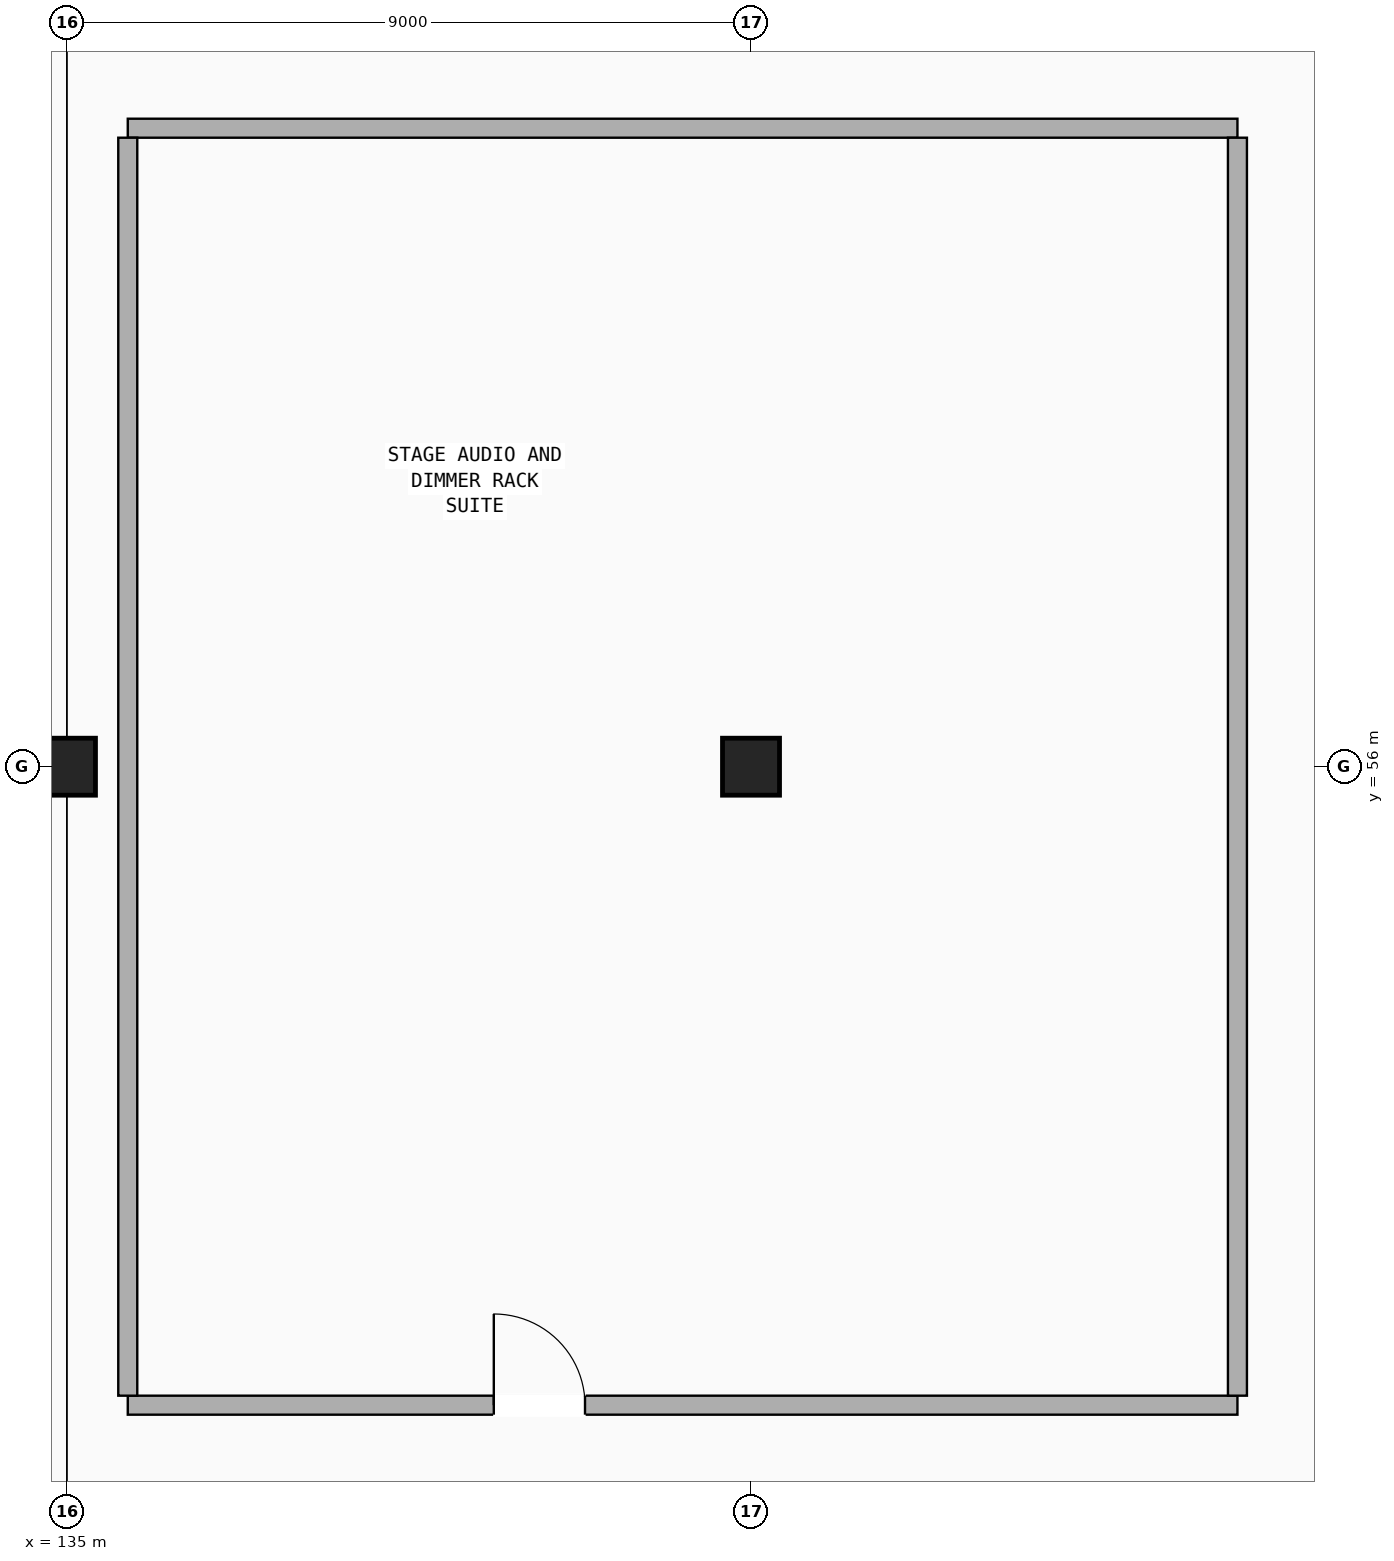
"""IFC4 building model, lengths in metres.
Left out: names, types, materials, properties, quantities, classifications, styles, units other than length and angle.
Written with IfcOpenShell. Run it as: python <this file> out.ifc"""

import sys

from ifc_helpers import new_model, si_unit, direction, frame, frame_2d, origin, origin_2d, place, context, subcontext, project, spatial, rectangle, extrude, element, fill, save


model = new_model("IFC4")
c1 = context("Model", 3, precision=1e-05, world=origin(), true_north=direction((0.0, 1.0)))
c2 = subcontext(c1, "Body", "Model", "MODEL_VIEW")
j1 = project(units=[si_unit("LENGTHUNIT", "METRE"), si_unit("PLANEANGLEUNIT", "RADIAN")], contexts=[c1])
p1 = place(None, origin())
s1 = spatial("IfcSite", under=j1, at=p1, CompositionType="ELEMENT")
p2 = place(p1, origin())
s2 = spatial("IfcBuilding", under=s1, at=p2, CompositionType="ELEMENT")
p3 = place(p2, frame((0.0, 0.0, 9.52)))
s3 = spatial("IfcBuildingStorey", under=s2, at=p3, CompositionType="ELEMENT", Elevation=9.52)
for number, where, z_axis, x_axis in (
    (1, (135.0, 56.0, 0.0), (0.0, 0.0, 1.0), (1.0, 0.0, 0.0)),
    (2, (144.0, 56.0, 0.0), (0.0, 0.0, 1.0), (1.0, 0.0, 0.0)),
):
    element("IfcColumn", number, at=place(p3, frame(where, z_axis=z_axis, x_axis=x_axis)), inside=s3, PredefinedType="COLUMN", context=c2, shape_type="SweptSolid", body=[
        extrude(rectangle(XDim=0.75, YDim=0.75, at=origin_2d()), origin(), (0.0, 0.0, 1.0), 4.08),
    ])
p4 = place(p3, frame((135.8, 47.6, 0.0), z_axis=(0.0, 0.0, 1.0), x_axis=(1.0, 0.0, 0.0)))
e3 = element("IfcWall", 3, at=p4, inside=s3, PredefinedType="PARTITIONING", context=c2, shape_type="SweptSolid", body=[
    extrude(rectangle(XDim=14.6, YDim=0.25, at=frame_2d((7.3, 0.0))), origin(), (0.0, 0.0, 1.0), 3.17),
])
p5 = place(p4, frame((4.816, 0.0, 0.0)))
e4 = element("IfcOpeningElement", 4, at=p5, cuts=e3, PredefinedType="OPENING", context=c2, shape_type="SweptSolid", body=[
    extrude(rectangle(XDim=1.2, YDim=2.2, at=frame_2d((0.6, 1.1))), frame((0.0, 0.135, 0.0), z_axis=(0.0, -1.0, 0.0), x_axis=(1.0, 0.0, 0.0)), (0.0, 0.0, 1.0), 0.27),
])
p6 = place(p3, frame((135.8, 64.4, 0.0), z_axis=(0.0, 0.0, 1.0), x_axis=(1.0, 0.0, 0.0)))
e5 = element("IfcWall", 5, at=p6, inside=s3, PredefinedType="PARTITIONING", context=c2, shape_type="SweptSolid", body=[
    extrude(rectangle(XDim=14.6, YDim=0.25, at=frame_2d((7.3, 0.0))), origin(), (0.0, 0.0, 1.0), 2.97),
])
p7 = place(p3, frame((135.8, 47.725, 0.0), z_axis=(0.0, 0.0, 1.0), x_axis=(0.0, 1.0, 0.0)))
e6 = element("IfcWall", 6, at=p7, inside=s3, PredefinedType="PARTITIONING", context=c2, shape_type="SweptSolid", body=[
    extrude(rectangle(XDim=16.55, YDim=0.25, at=frame_2d((8.275, 0.0))), origin(), (0.0, 0.0, 1.0), 2.97),
])
p8 = place(p3, frame((150.4, 47.725, 0.0), z_axis=(0.0, 0.0, 1.0), x_axis=(0.0, 1.0, 0.0)))
e7 = element("IfcWall", 7, at=p8, inside=s3, PredefinedType="PARTITIONING", context=c2, shape_type="SweptSolid", body=[
    extrude(rectangle(XDim=16.55, YDim=0.25, at=frame_2d((8.275, 0.0))), origin(), (0.0, 0.0, 1.0), 3.07),
])
p9 = place(p5, origin())
e8 = element("IfcDoor", 8, at=p9, inside=s3, OperationType="SINGLE_SWING_LEFT", PredefinedType="DOOR", context=c2, shape_type="SweptSolid", body=[
    extrude(rectangle(XDim=1.2, YDim=2.2, at=frame_2d((0.6, 1.1))), frame((0.0, 0.025, 0.0), z_axis=(0.0, -1.0, 0.0), x_axis=(1.0, 0.0, 0.0)), (0.0, 0.0, 1.0), 0.05),
])
fill(e4, e8)
save(model, sys.argv[1])
